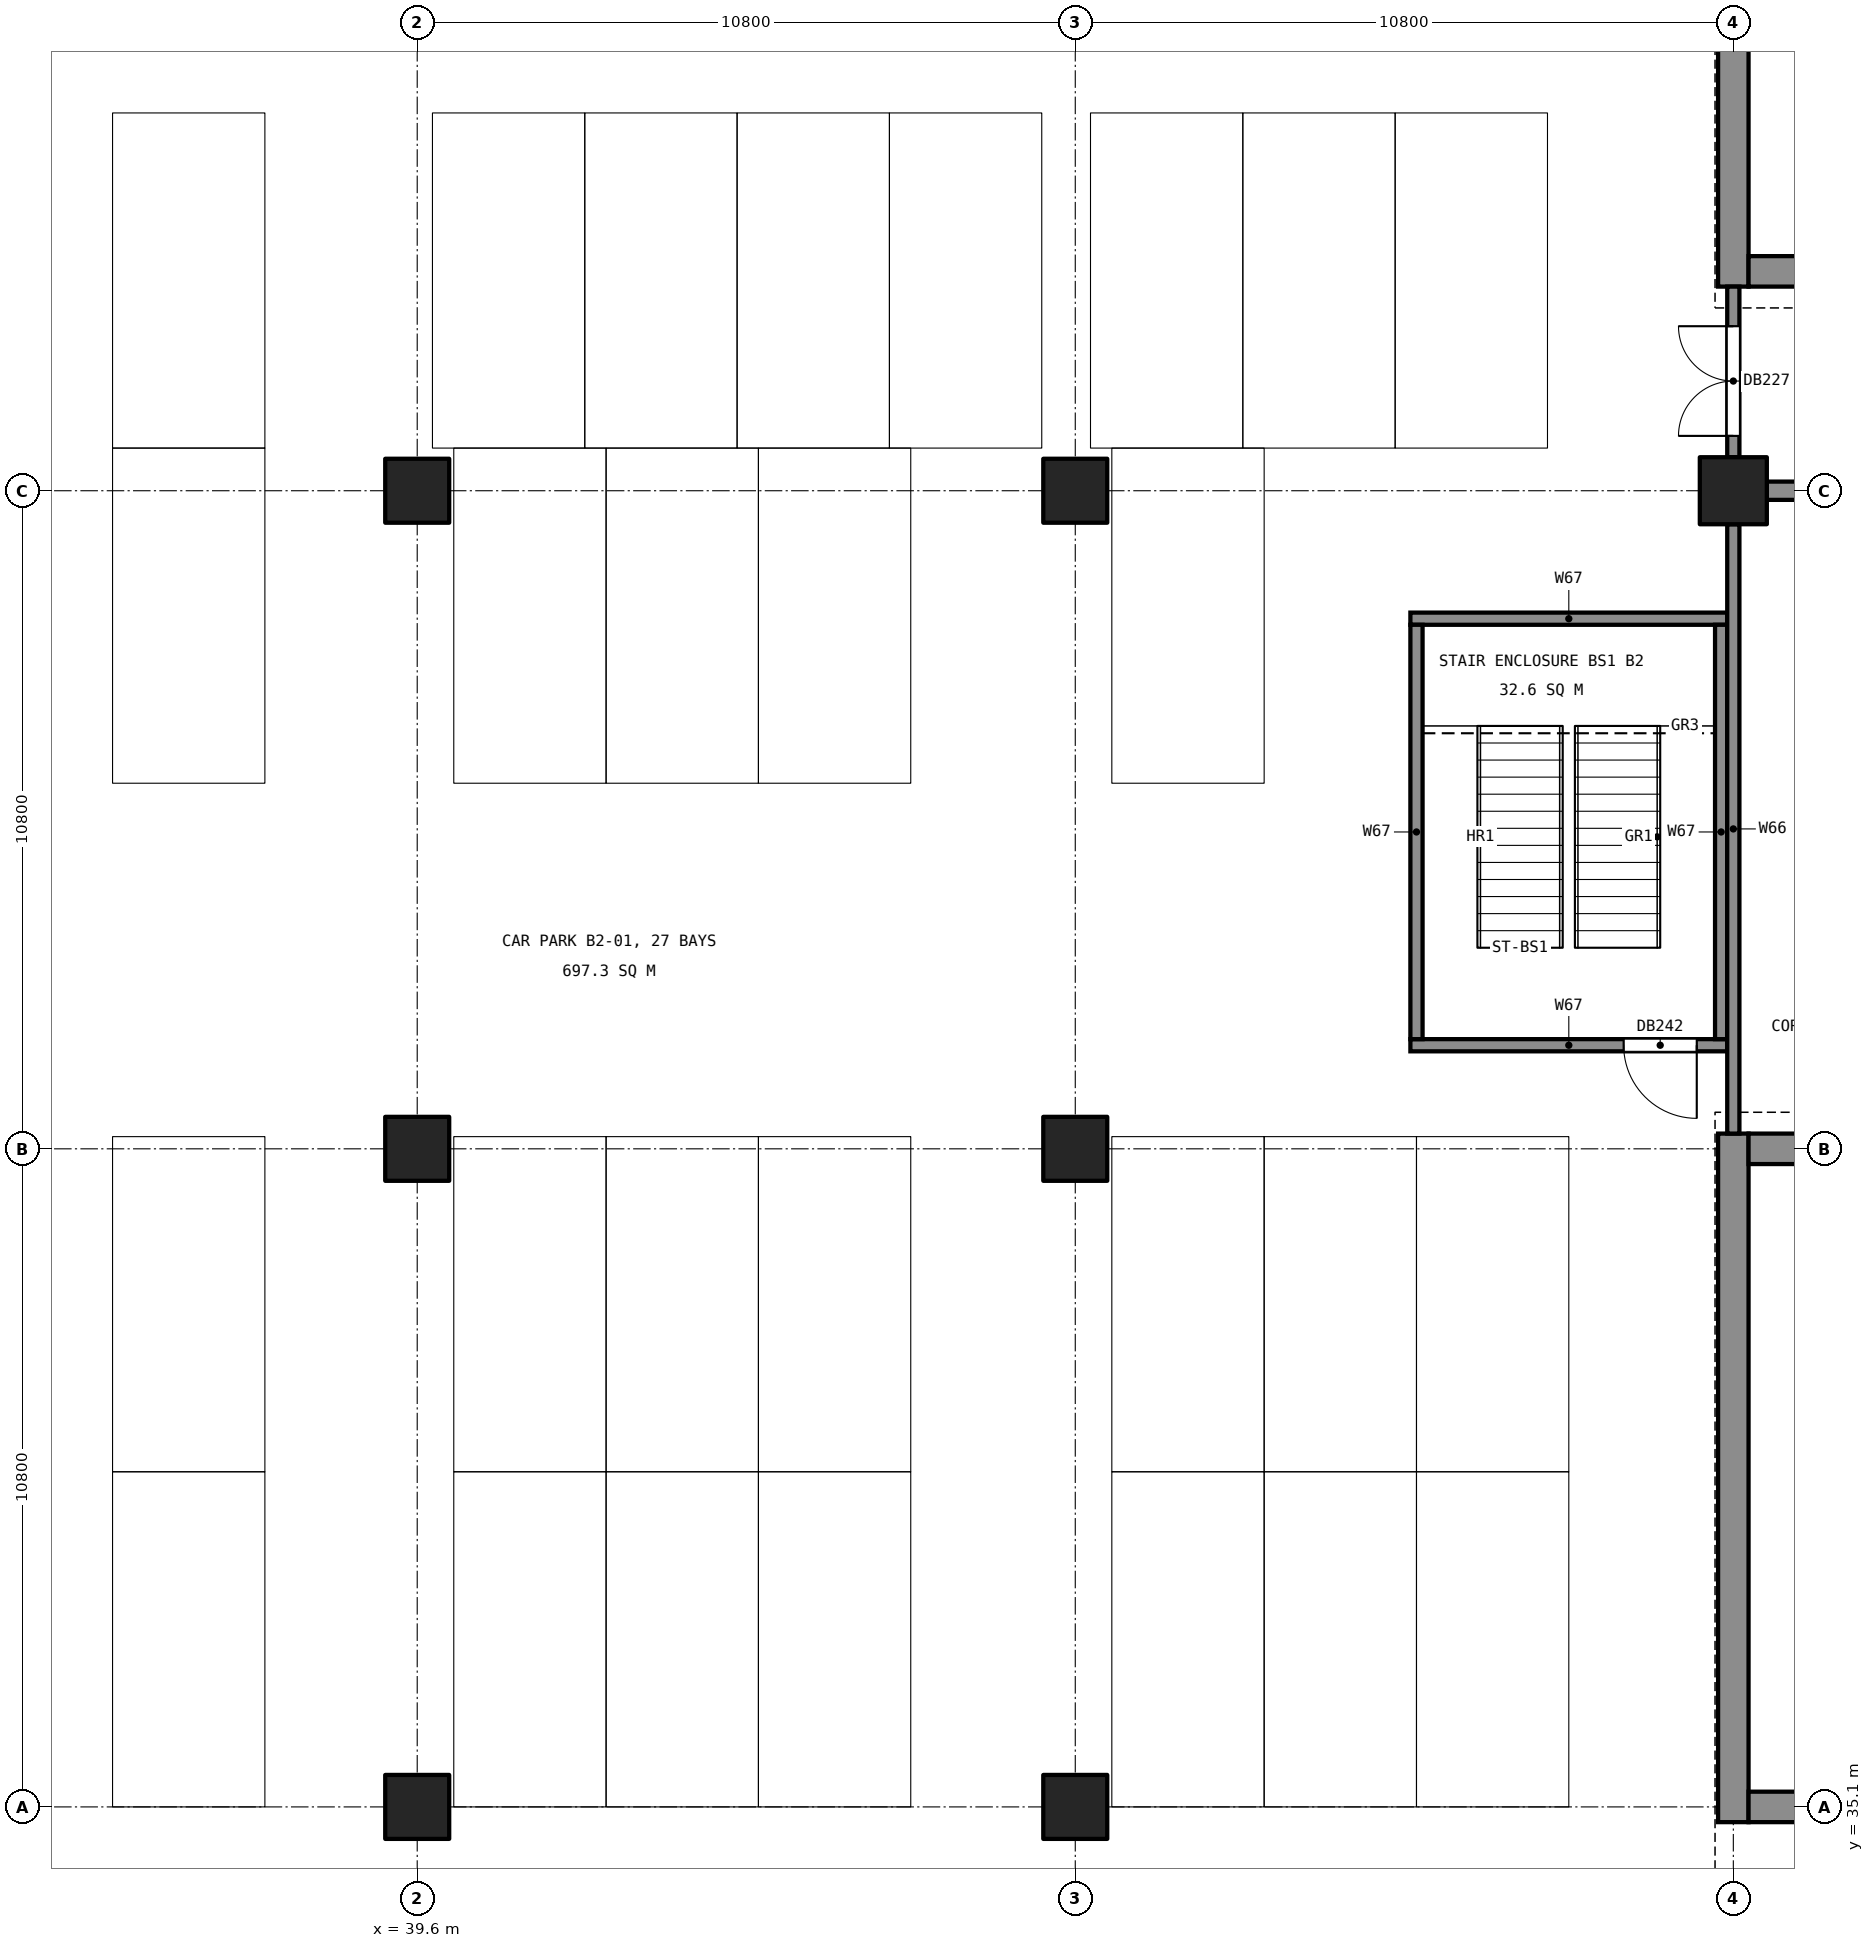
"""IFC4 building model, lengths in metres.
Left out: names, types, materials, properties, quantities, classifications, styles, units other than length and angle.
Written with IfcOpenShell. Run it as: python <this file> out.ifc"""

import sys

from ifc_helpers import new_model, si_unit, direction, frame, frame_2d, origin, origin_2d, place, context, subcontext, project, spatial, rectangle, extrude, element, fill, save


model = new_model("IFC4")
c1 = context("Model", 3, precision=1e-05, world=origin(), true_north=direction((0.0, 1.0)))
c2 = subcontext(c1, "Body", "Model", "MODEL_VIEW")
j1 = project(units=[si_unit("LENGTHUNIT", "METRE"), si_unit("PLANEANGLEUNIT", "RADIAN")], contexts=[c1])
p1 = place(None, origin())
s1 = spatial("IfcSite", under=j1, at=p1, CompositionType="ELEMENT")
p2 = place(p1, origin())
s2 = spatial("IfcBuilding", under=s1, at=p2, CompositionType="ELEMENT")
p3 = place(p2, frame((0.0, 0.0, -9.6)))
s3 = spatial("IfcBuildingStorey", under=s2, at=p3, CompositionType="ELEMENT", Elevation=-9.6)
p4 = place(p3, frame((61.2, 56.7, 0.0), z_axis=(0.0, 0.0, 1.0), x_axis=(1.0, 0.0, 0.0)))
e1 = element("IfcColumn", 1, at=p4, inside=s3, PredefinedType="COLUMN", context=c2, shape_type="SweptSolid", body=[
    extrude(rectangle(XDim=1.1, YDim=1.1, at=origin_2d()), origin(), (0.0, 0.0, 1.0), 4.35),
])
for number, where, z_axis, x_axis in (
    (2, (39.6, 35.1, 0.0), (0.0, 0.0, 1.0), (1.0, 0.0, 0.0)),
    (3, (39.6, 45.9, 0.0), (0.0, 0.0, 1.0), (1.0, 0.0, 0.0)),
    (4, (39.6, 56.7, 0.0), (0.0, 0.0, 1.0), (1.0, 0.0, 0.0)),
    (5, (50.4, 35.1, 0.0), (0.0, 0.0, 1.0), (1.0, 0.0, 0.0)),
    (6, (50.4, 45.9, 0.0), (0.0, 0.0, 1.0), (1.0, 0.0, 0.0)),
    (7, (50.4, 56.7, 0.0), (0.0, 0.0, 1.0), (1.0, 0.0, 0.0)),
):
    element("IfcColumn", number, at=place(p3, frame(where, z_axis=z_axis, x_axis=x_axis)), inside=s3, PredefinedType="COLUMN", context=c2, shape_type="SweptSolid", body=[
        extrude(rectangle(XDim=1.05, YDim=1.05, at=origin_2d()), origin(), (0.0, 0.0, 1.0), 4.35),
    ])
p5 = place(p3, frame((61.2, 34.85, 0.0), z_axis=(0.0, 0.0, 1.0), x_axis=(0.0, 1.0, 0.0)))
e8 = element("IfcWall", 8, at=p5, inside=s3, PredefinedType="SHEAR", context=c2, shape_type="SweptSolid", body=[
    extrude(rectangle(XDim=11.3, YDim=0.5, at=frame_2d((5.65, 0.0))), origin(), (0.0, 0.0, 1.0), 4.35),
])
for number, where, z_axis, x_axis in (
    (9, (61.45, 35.1, 0.0), (0.0, 0.0, 1.0), (1.0, 0.0, 0.0)),
    (10, (61.45, 45.9, 0.0), (0.0, 0.0, 1.0), (1.0, 0.0, 0.0)),
):
    element("IfcWall", number, at=place(p3, frame(where, z_axis=z_axis, x_axis=x_axis)), inside=s3, PredefinedType="SHEAR", context=c2, shape_type="SweptSolid", body=[
        extrude(rectangle(XDim=4.0, YDim=0.5, at=frame_2d((2.0, 0.0))), origin(), (0.0, 0.0, 1.0), 4.35),
    ])
p6 = place(p3, frame((61.2, 60.05, 0.0), z_axis=(0.0, 0.0, 1.0), x_axis=(0.0, 1.0, 0.0)))
e11 = element("IfcWall", 11, at=p6, inside=s3, PredefinedType="SHEAR", context=c2, shape_type="SweptSolid", body=[
    extrude(rectangle(XDim=14.9, YDim=0.5, at=frame_2d((7.45, 0.0))), origin(), (0.0, 0.0, 1.0), 4.35),
])
p7 = place(p3, frame((61.45, 60.3, 0.0), z_axis=(0.0, 0.0, 1.0), x_axis=(1.0, 0.0, 0.0)))
e12 = element("IfcWall", 12, at=p7, inside=s3, PredefinedType="SHEAR", context=c2, shape_type="SweptSolid", body=[
    extrude(rectangle(XDim=4.0, YDim=0.5, at=frame_2d((2.0, 0.0))), origin(), (0.0, 0.0, 1.0), 4.35),
])
p8 = place(p3, frame((61.75, 56.7, 0.0), z_axis=(0.0, 0.0, 1.0), x_axis=(1.0, 0.0, 0.0)))
e13 = element("IfcWall", 13, at=p8, inside=s3, PredefinedType="SHEAR", context=c2, shape_type="SweptSolid", body=[
    extrude(rectangle(XDim=6.1, YDim=0.3, at=frame_2d((3.05, 0.0))), origin(), (0.0, 0.0, 1.0), 4.35),
])
p9 = place(p8, frame((2.15, 0.0, 0.0)))
e14 = element("IfcOpeningElement", 14, at=p9, cuts=e13, PredefinedType="OPENING", context=c2, shape_type="SweptSolid", body=[
    extrude(rectangle(XDim=1.8, YDim=2.1, at=frame_2d((0.9, 1.05))), frame((0.0, 0.16, 0.0), z_axis=(0.0, -1.0, 0.0), x_axis=(1.0, 0.0, 0.0)), (0.0, 0.0, 1.0), 0.32),
])
p10 = place(p3, frame((55.9, 47.6, 0.0), z_axis=(0.0, 0.0, 1.0), x_axis=(1.0, 0.0, 0.0)))
e15 = element("IfcWall", 15, at=p10, inside=s3, PredefinedType="SOLIDWALL", context=c2, shape_type="SweptSolid", body=[
    extrude(rectangle(XDim=5.2, YDim=0.2, at=frame_2d((2.6, 0.0))), origin(), (0.0, 0.0, 1.0), 4.35),
])
p11 = place(p10, frame((3.5, 0.0, 0.0)))
e16 = element("IfcOpeningElement", 16, at=p11, cuts=e15, PredefinedType="OPENING", context=c2, shape_type="SweptSolid", body=[
    extrude(rectangle(XDim=1.2, YDim=2.1, at=frame_2d((0.6, 1.05))), frame((0.0, 0.11, 0.0), z_axis=(0.0, -1.0, 0.0), x_axis=(1.0, 0.0, 0.0)), (0.0, 0.0, 1.0), 0.22),
])
p12 = place(p3, frame((55.9, 54.6, 0.0), z_axis=(0.0, 0.0, 1.0), x_axis=(1.0, 0.0, 0.0)))
e17 = element("IfcWall", 17, at=p12, inside=s3, PredefinedType="SOLIDWALL", context=c2, shape_type="SweptSolid", body=[
    extrude(rectangle(XDim=5.2, YDim=0.2, at=frame_2d((2.6, 0.0))), origin(), (0.0, 0.0, 1.0), 4.35),
])
for number, where, z_axis, x_axis in (
    (18, (56.0, 47.7, 0.0), (0.0, 0.0, 1.0), (0.0, 1.0, 0.0)),
    (19, (61.0, 47.7, 0.0), (0.0, 0.0, 1.0), (0.0, 1.0, 0.0)),
):
    element("IfcWall", number, at=place(p3, frame(where, z_axis=z_axis, x_axis=x_axis)), inside=s3, PredefinedType="SOLIDWALL", context=c2, shape_type="SweptSolid", body=[
        extrude(rectangle(XDim=6.8, YDim=0.2, at=frame_2d((3.4, 0.0))), origin(), (0.0, 0.0, 1.0), 4.35),
    ])
p13 = place(p3, frame((61.2, 46.15, 0.0), z_axis=(0.0, 0.0, 1.0), x_axis=(0.0, 1.0, 0.0)))
e20 = element("IfcWall", 20, at=p13, inside=s3, PredefinedType="SOLIDWALL", context=c2, shape_type="SweptSolid", body=[
    extrude(rectangle(XDim=10.0, YDim=0.2, at=frame_2d((5.0, 0.0))), origin(), (0.0, 0.0, 1.0), 4.35),
])
p14 = place(p3, frame((61.2, 57.25, 0.0), z_axis=(0.0, 0.0, 1.0), x_axis=(0.0, 1.0, 0.0)))
e21 = element("IfcWall", 21, at=p14, inside=s3, PredefinedType="SOLIDWALL", context=c2, shape_type="SweptSolid", body=[
    extrude(rectangle(XDim=2.8, YDim=0.2, at=frame_2d((1.4, 0.0))), origin(), (0.0, 0.0, 1.0), 4.35),
])
p15 = place(p14, frame((0.35, 0.0, 0.0)))
e22 = element("IfcOpeningElement", 22, at=p15, cuts=e21, PredefinedType="OPENING", context=c2, shape_type="SweptSolid", body=[
    extrude(rectangle(XDim=1.8, YDim=2.1, at=frame_2d((0.9, 1.05))), frame((0.0, 0.11, 0.0), z_axis=(0.0, -1.0, 0.0), x_axis=(1.0, 0.0, 0.0)), (0.0, 0.0, 1.0), 0.22),
])
p16 = place(p15, origin())
e23 = element("IfcDoor", 23, at=p16, inside=s3, OperationType="DOUBLE_DOOR_SINGLE_SWING", PredefinedType="DOOR", context=c2, shape_type="SweptSolid", body=[
    extrude(rectangle(XDim=1.8, YDim=2.1, at=frame_2d((0.9, 1.05))), frame((0.0, 0.025, 0.0), z_axis=(0.0, -1.0, 0.0), x_axis=(1.0, 0.0, 0.0)), (0.0, 0.0, 1.0), 0.05),
])
fill(e22, e23)
p17 = place(p11, frame((1.2, 0.0, 0.0), z_axis=(0.0, 0.0, 1.0), x_axis=(-1.0, 0.0, 0.0)))
e24 = element("IfcDoor", 24, at=p17, inside=s3, OperationType="SINGLE_SWING_LEFT", PredefinedType="DOOR", context=c2, shape_type="SweptSolid", body=[
    extrude(rectangle(XDim=1.2, YDim=2.1, at=frame_2d((0.6, 1.05))), frame((0.0, 0.025, 0.0), z_axis=(0.0, -1.0, 0.0), x_axis=(1.0, 0.0, 0.0)), (0.0, 0.0, 1.0), 0.05),
])
fill(e16, e24)
save(model, sys.argv[1])
